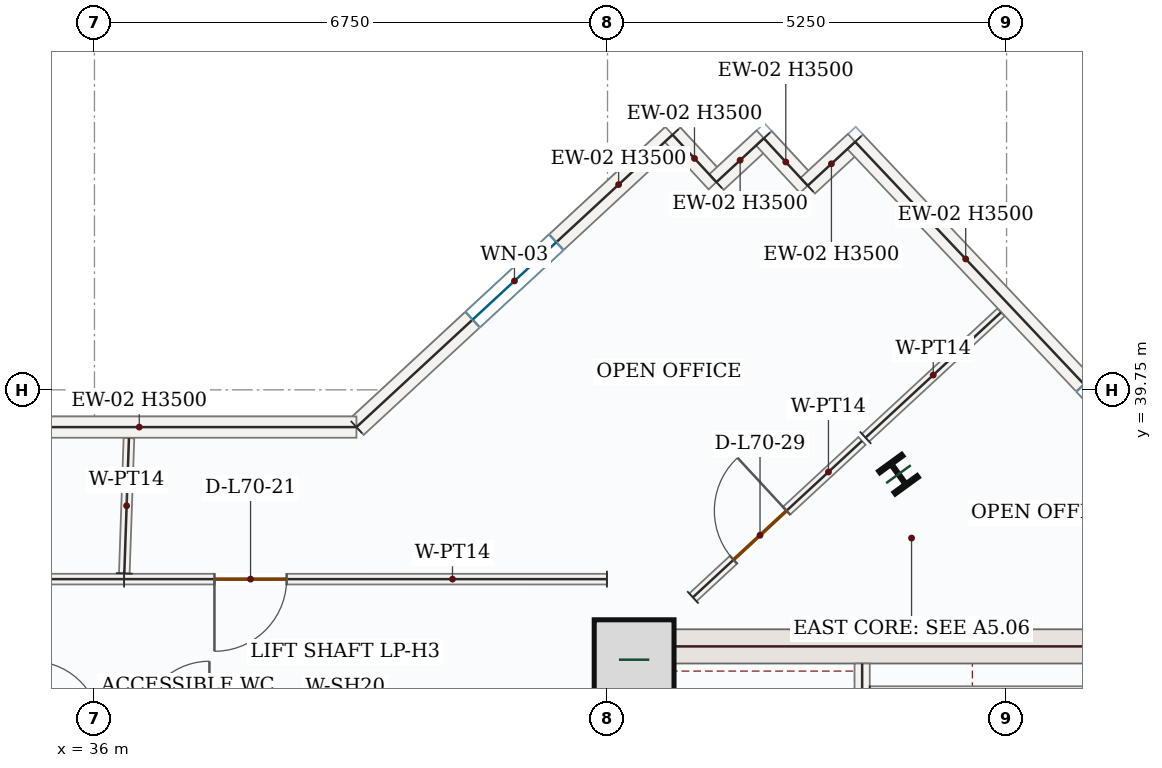
"""IFC4 building model, lengths in metres.
Left out: names, types, materials, properties, quantities, classifications, styles, units other than length and angle.
Written with IfcOpenShell. Run it as: python <this file> out.ifc"""

import sys

from ifc_helpers import new_model, si_unit, direction, frame, frame_2d, origin, origin_2d, place, context, subcontext, project, spatial, rectangle, i_section, extrude, source, transform, mapped, element, fill, save


model = new_model("IFC4")
c1 = context("Model", 3, precision=1e-05, world=origin(), true_north=direction((0.0, 1.0)))
c2 = subcontext(c1, "Body", "Model", "MODEL_VIEW")
j1 = project(units=[si_unit("LENGTHUNIT", "METRE"), si_unit("PLANEANGLEUNIT", "RADIAN")], contexts=[c1])
p1 = place(None, origin())
s1 = spatial("IfcSite", under=j1, at=p1, CompositionType="ELEMENT")
p2 = place(p1, origin())
s2 = spatial("IfcBuilding", under=s1, at=p2, CompositionType="ELEMENT")
p3 = place(p2, frame((0.0, 0.0, 291.6)))
s3 = spatial("IfcBuildingStorey", under=s2, at=p3, CompositionType="ELEMENT", Elevation=291.6)
p4 = place(p3, frame((42.975, 28.05, 0.0), z_axis=(0.0, 0.0, 1.0), x_axis=(0.0, 1.0, 0.0)))
e1 = element("IfcWall", 1, at=p4, inside=s3, PredefinedType="SHEAR", context=c2, shape_type="SweptSolid", body=[
    extrude(rectangle(XDim=8.55, YDim=0.45, at=frame_2d((4.275, 0.0))), origin(), (0.0, 0.0, 1.0), 3.5),
])
p5 = place(p4, frame((1.5, 0.0, 0.0)))
e2 = element("IfcOpeningElement", 2, at=p5, cuts=e1, PredefinedType="OPENING", context=c2, shape_type="SweptSolid", body=[
    extrude(rectangle(XDim=1.1, YDim=2.2, at=frame_2d((0.55, 1.1))), frame((0.0, 0.235, 0.0), z_axis=(0.0, -1.0, 0.0), x_axis=(1.0, 0.0, 0.0)), (0.0, 0.0, 1.0), 0.47),
])
m1 = source(origin(), c2, "Body", "SweptSolid", [
    extrude(rectangle(XDim=7.1, YDim=0.45, at=frame_2d((3.55, 0.0))), origin(), (0.0, 0.0, 1.0), 3.5),
])
p6 = place(p3, frame((43.2, 36.375, 0.0), z_axis=(0.0, 0.0, 1.0), x_axis=(1.0, 0.0, 0.0)))
e3 = element("IfcWall", 3, at=p6, inside=s3, PredefinedType="SHEAR", context=c2, shape_type="MappedRepresentation", body=[
    mapped(m1, transform((0.0, 0.0, 0.0), x_axis=(1.0, 0.0, 0.0), y_axis=(0.0, 1.0, 0.0), z_axis=(0.0, 0.0, 1.0), scale=1.0)),
])
m2 = source(origin(), c2, "Body", "SweptSolid", [
    extrude(rectangle(XDim=1.05, YDim=1.05, at=origin_2d()), origin(), (0.0, 0.0, 1.0), 3.75),
])
p7 = place(p3, frame((43.1, 36.2, 0.0), z_axis=(0.0, 0.0, 1.0), x_axis=(1.0, 0.0, 0.0)))
e4 = element("IfcColumn", 4, at=p7, inside=s3, PredefinedType="COLUMN", context=c2, shape_type="MappedRepresentation", body=[
    mapped(m2, transform((0.0, 0.0, 0.0), x_axis=(1.0, 0.0, 0.0), y_axis=(0.0, 1.0, 0.0), z_axis=(0.0, 0.0, 1.0), scale=1.0)),
])
m3 = source(origin(), c2, "Body", "SweptSolid", [
    extrude(i_section(OverallWidth=0.374, OverallDepth=0.372, WebThickness=0.016, FlangeThickness=0.026, FilletRadius=0.018, at=origin_2d()), origin(), (0.0, 0.0, 1.0), 3.75),
])
p8 = place(p3, frame((46.578, 38.641, 0.0), z_axis=(0.0, 0.0, 1.0), x_axis=(0.809016994375, 0.587785252292, 0.0)))
e5 = element("IfcColumn", 5, at=p8, inside=s3, PredefinedType="COLUMN", context=c2, shape_type="MappedRepresentation", body=[
    mapped(m3, transform((0.0, 0.0, 0.0), x_axis=(1.0, 0.0, 0.0), y_axis=(0.0, 1.0, 0.0), z_axis=(0.0, 0.0, 1.0), scale=1.0)),
])
p9 = place(p3, frame((39.447, 39.26, 0.0), z_axis=(0.0, 0.0, 1.0), x_axis=(0.734109106874, 0.679031530346, 0.0)))
e6 = element("IfcWall", 6, at=p9, inside=s3, PredefinedType="SOLIDWALL", context=c2, shape_type="SweptSolid", body=[
    extrude(rectangle(XDim=5.665, YDim=0.28, at=frame_2d((2.833, 0.0))), origin(), (0.0, 0.0, 1.0), 3.5),
])
p10 = place(p9, frame((2.082, 0.0, 0.85)))
e7 = element("IfcOpeningElement", 7, at=p10, cuts=e6, PredefinedType="OPENING", context=c2, shape_type="SweptSolid", body=[
    extrude(rectangle(XDim=1.5, YDim=1.5, at=frame_2d((0.75, 0.75))), frame((0.0, 0.15, 0.0), z_axis=(0.0, -1.0, 0.0), x_axis=(1.0, 0.0, 0.0)), (0.0, 0.0, 1.0), 0.3),
])
m4 = source(origin(), c2, "Body", "SweptSolid", [
    extrude(rectangle(XDim=0.85, YDim=0.28, at=frame_2d((0.425, 0.0))), origin(), (0.0, 0.0, 1.0), 3.5),
])
for number, where, z_axis, x_axis in (
    (8, (43.605, 43.107, 0.0), (0.0, 0.0, 1.0), (0.679, -0.734, 0.0)),
    (9, (44.183, 42.483, 0.0), (0.0, 0.0, 1.0), (0.734, 0.679, 0.0)),
    (10, (44.807, 43.06, 0.0), (0.0, 0.0, 1.0), (0.679, -0.734, 0.0)),
    (11, (45.384, 42.436, 0.0), (0.0, 0.0, 1.0), (0.734, 0.679, 0.0)),
):
    element("IfcWall", number, at=place(p3, frame(where, z_axis=z_axis, x_axis=x_axis)), inside=s3, PredefinedType="SOLIDWALL", context=c2, shape_type="MappedRepresentation", body=[
        mapped(m4, transform((0.0, 0.0, 0.0), x_axis=(1.0, 0.0, 0.0), y_axis=(0.0, 1.0, 0.0), z_axis=(0.0, 0.0, 1.0), scale=1.0)),
    ])
p11 = place(p3, frame((46.008, 43.013, 0.0), z_axis=(0.0, 0.0, 1.0), x_axis=(0.68643580465, -0.727190405667, 0.0)))
e12 = element("IfcWall", 12, at=p11, inside=s3, PredefinedType="SOLIDWALL", context=c2, shape_type="SweptSolid", body=[
    extrude(rectangle(XDim=10.274, YDim=0.28, at=frame_2d((5.137, 0.0))), origin(), (0.0, 0.0, 1.0), 3.5),
])
p12 = place(p11, frame((4.387, 0.0, 0.85)))
e13 = element("IfcOpeningElement", 13, at=p12, cuts=e12, PredefinedType="OPENING", context=c2, shape_type="SweptSolid", body=[
    extrude(rectangle(XDim=1.5, YDim=1.5, at=frame_2d((0.75, 0.75))), frame((0.0, 0.15, 0.0), z_axis=(0.0, -1.0, 0.0), x_axis=(1.0, 0.0, 0.0)), (0.0, 0.0, 1.0), 0.3),
])
m5 = source(origin(), c2, "Body", "SweptSolid", [
    extrude(rectangle(XDim=5.714, YDim=0.28, at=frame_2d((2.857, 0.0))), origin(), (0.0, 0.0, 1.0), 3.5),
])
p13 = place(p3, frame((33.732, 39.26, 0.0), z_axis=(0.0, 0.0, 1.0), x_axis=(1.0, 0.0, 0.0)))
e14 = element("IfcWall", 14, at=p13, inside=s3, PredefinedType="SOLIDWALL", context=c2, shape_type="MappedRepresentation", body=[
    mapped(m5, transform((0.0, 0.0, 0.0), x_axis=(1.0, 0.0, 0.0), y_axis=(0.0, 1.0, 0.0), z_axis=(0.0, 0.0, 1.0), scale=1.0)),
])
p14 = place(p3, frame((46.1, 28.15, 0.0), z_axis=(0.0, 0.0, 1.0), x_axis=(0.0, 1.0, 0.0)))
e15 = element("IfcWall", 15, at=p14, inside=s3, PredefinedType="SOLIDWALL", context=c2, shape_type="SweptSolid", body=[
    extrude(rectangle(XDim=8.0, YDim=0.2, at=frame_2d((4.0, 0.0))), origin(), (0.0, 0.0, 1.0), 3.5),
])
p15 = place(p14, frame((0.4, 0.0, 0.0)))
e16 = element("IfcOpeningElement", 16, at=p15, cuts=e15, PredefinedType="OPENING", context=c2, shape_type="SweptSolid", body=[
    extrude(rectangle(XDim=1.05, YDim=2.15, at=frame_2d((0.525, 1.075))), frame((0.0, 0.11, 0.0), z_axis=(0.0, -1.0, 0.0), x_axis=(1.0, 0.0, 0.0)), (0.0, 0.0, 1.0), 0.22),
])
m6 = source(origin(), c2, "Body", "SweptSolid", [
    extrude(rectangle(XDim=3.25, YDim=0.2, at=frame_2d((1.625, 0.0))), origin(), (0.0, 0.0, 1.0), 3.5),
])
p16 = place(p3, frame((46.2, 35.75, 0.0), z_axis=(0.0, 0.0, 1.0), x_axis=(1.0, 0.0, 0.0)))
e17 = element("IfcWall", 17, at=p16, inside=s3, PredefinedType="SOLIDWALL", context=c2, shape_type="MappedRepresentation", body=[
    mapped(m6, transform((0.0, 0.0, 0.0), x_axis=(1.0, 0.0, 0.0), y_axis=(0.0, 1.0, 0.0), z_axis=(0.0, 0.0, 1.0), scale=1.0)),
])
p17 = place(p3, frame((43.873, 37.02, 0.0), z_axis=(0.0, 0.0, 1.0), x_axis=(0.734120521476, 0.679019189676, 0.0)))
e18 = element("IfcWall", 18, at=p17, inside=s3, PredefinedType="PARTITIONING", context=c2, shape_type="SweptSolid", body=[
    extrude(rectangle(XDim=3.031, YDim=0.14, at=frame_2d((1.515, 0.0))), origin(), (0.0, 0.0, 1.0), 3.5),
])
p18 = place(p17, frame((0.728, 0.0, 0.0)))
e19 = element("IfcOpeningElement", 19, at=p18, cuts=e18, PredefinedType="OPENING", context=c2, shape_type="SweptSolid", body=[
    extrude(rectangle(XDim=0.95, YDim=2.15, at=frame_2d((0.475, 1.075))), frame((0.0, 0.08, 0.0), z_axis=(0.0, -1.0, 0.0), x_axis=(1.0, 0.0, 0.0)), (0.0, 0.0, 1.0), 0.16),
])
m7 = source(origin(), c2, "Body", "SweptSolid", [
    extrude(rectangle(XDim=2.428, YDim=0.14, at=frame_2d((1.214, 0.0))), origin(), (0.0, 0.0, 1.0), 3.5),
])
p19 = place(p3, frame((46.144, 39.121, 0.0), z_axis=(0.0, 0.0, 1.0), x_axis=(0.734124504125, 0.679014883815, 0.0)))
e20 = element("IfcWall", 20, at=p19, inside=s3, PredefinedType="PARTITIONING", context=c2, shape_type="MappedRepresentation", body=[
    mapped(m7, transform((0.0, 0.0, 0.0), x_axis=(1.0, 0.0, 0.0), y_axis=(0.0, 1.0, 0.0), z_axis=(0.0, 0.0, 1.0), scale=1.0)),
])
p20 = place(p3, frame((42.742, 37.26, 0.0), z_axis=(0.0, 0.0, 1.0), x_axis=(-0.999999999261, 3.8433452e-05, 0.0)))
e21 = element("IfcWall", 21, at=p20, inside=s3, PredefinedType="PARTITIONING", context=c2, shape_type="SweptSolid", body=[
    extrude(rectangle(XDim=6.352, YDim=0.14, at=frame_2d((3.176, 0.0))), origin(), (0.0, 0.0, 1.0), 3.5),
])
p21 = place(p20, frame((4.214, 0.0, 0.0)))
e22 = element("IfcOpeningElement", 22, at=p21, cuts=e21, PredefinedType="OPENING", context=c2, shape_type="SweptSolid", body=[
    extrude(rectangle(XDim=0.95, YDim=2.15, at=frame_2d((0.475, 1.075))), frame((0.0, 0.08, 0.0), z_axis=(0.0, -1.0, 0.0), x_axis=(1.0, 0.0, 0.0)), (0.0, 0.0, 1.0), 0.16),
])
m8 = source(origin(), c2, "Body", "SweptSolid", [
    extrude(rectangle(XDim=1.781, YDim=0.14, at=frame_2d((0.891, 0.0))), origin(), (0.0, 0.0, 1.0), 3.5),
])
p22 = place(p3, frame((36.393, 37.335, 0.0), z_axis=(0.0, 0.0, 1.0), x_axis=(0.034268709891, 0.999412655274, 0.0)))
e23 = element("IfcWall", 23, at=p22, inside=s3, PredefinedType="PARTITIONING", context=c2, shape_type="MappedRepresentation", body=[
    mapped(m8, transform((0.0, 0.0, 0.0), x_axis=(1.0, 0.0, 0.0), y_axis=(0.0, 1.0, 0.0), z_axis=(0.0, 0.0, 1.0), scale=1.0)),
])
p23 = place(p3, frame((36.39, 37.26, 0.0), z_axis=(0.0, 0.0, 1.0), x_axis=(-0.999999997659, -6.8420512e-05, 0.0)))
e24 = element("IfcWall", 24, at=p23, inside=s3, PredefinedType="PARTITIONING", context=c2, shape_type="SweptSolid", body=[
    extrude(rectangle(XDim=7.136, YDim=0.14, at=frame_2d((3.568, 0.0))), origin(), (0.0, 0.0, 1.0), 3.5),
])
p24 = place(p23, frame((1.361, 0.0, 0.0)))
e25 = element("IfcOpeningElement", 25, at=p24, cuts=e24, PredefinedType="OPENING", context=c2, shape_type="SweptSolid", body=[
    extrude(rectangle(XDim=0.95, YDim=2.15, at=frame_2d((0.475, 1.075))), frame((0.0, 0.08, 0.0), z_axis=(0.0, -1.0, 0.0), x_axis=(1.0, 0.0, 0.0)), (0.0, 0.0, 1.0), 0.16),
])
m9 = source(origin(), c2, "Body", "SweptSolid", [
    extrude(rectangle(XDim=1.5, YDim=1.5, at=frame_2d((0.75, 0.75))), frame((0.0, 0.03, 0.0), z_axis=(0.0, -1.0, 0.0), x_axis=(1.0, 0.0, 0.0)), (0.0, 0.0, 1.0), 0.06),
])
p25 = place(p10, origin())
e26 = element("IfcWindow", 26, at=p25, inside=s3, PartitioningType="SINGLE_PANEL", PredefinedType="WINDOW", context=c2, shape_type="MappedRepresentation", body=[
    mapped(m9, transform((0.0, 0.0, 0.0), x_axis=(1.0, 0.0, 0.0), y_axis=(0.0, 1.0, 0.0), z_axis=(0.0, 0.0, 1.0), scale=1.0)),
])
fill(e7, e26)
p26 = place(p12, origin())
e27 = element("IfcWindow", 27, at=p26, inside=s3, PartitioningType="SINGLE_PANEL", PredefinedType="WINDOW", context=c2, shape_type="MappedRepresentation", body=[
    mapped(m9, transform((0.0, 0.0, 0.0), x_axis=(1.0, 0.0, 0.0), y_axis=(0.0, 1.0, 0.0), z_axis=(0.0, 0.0, 1.0), scale=1.0)),
])
fill(e13, e27)
m10 = source(origin(), c2, "Body", "SweptSolid", [
    extrude(rectangle(XDim=0.95, YDim=2.15, at=frame_2d((0.475, 1.075))), frame((0.0, 0.025, 0.0), z_axis=(0.0, -1.0, 0.0), x_axis=(1.0, 0.0, 0.0)), (0.0, 0.0, 1.0), 0.05),
])
p27 = place(p21, origin())
e28 = element("IfcDoor", 28, at=p27, inside=s3, OperationType="SINGLE_SWING_RIGHT", PredefinedType="DOOR", context=c2, shape_type="MappedRepresentation", body=[
    mapped(m10, transform((0.0, 0.0, 0.0), x_axis=(1.0, 0.0, 0.0), y_axis=(0.0, 1.0, 0.0), z_axis=(0.0, 0.0, 1.0), scale=1.0)),
])
fill(e22, e28)
p28 = place(p18, origin())
e29 = element("IfcDoor", 29, at=p28, inside=s3, OperationType="SINGLE_SWING_RIGHT", PredefinedType="DOOR", context=c2, shape_type="MappedRepresentation", body=[
    mapped(m10, transform((0.0, 0.0, 0.0), x_axis=(1.0, 0.0, 0.0), y_axis=(0.0, 1.0, 0.0), z_axis=(0.0, 0.0, 1.0), scale=1.0)),
])
fill(e19, e29)
save(model, sys.argv[1])
